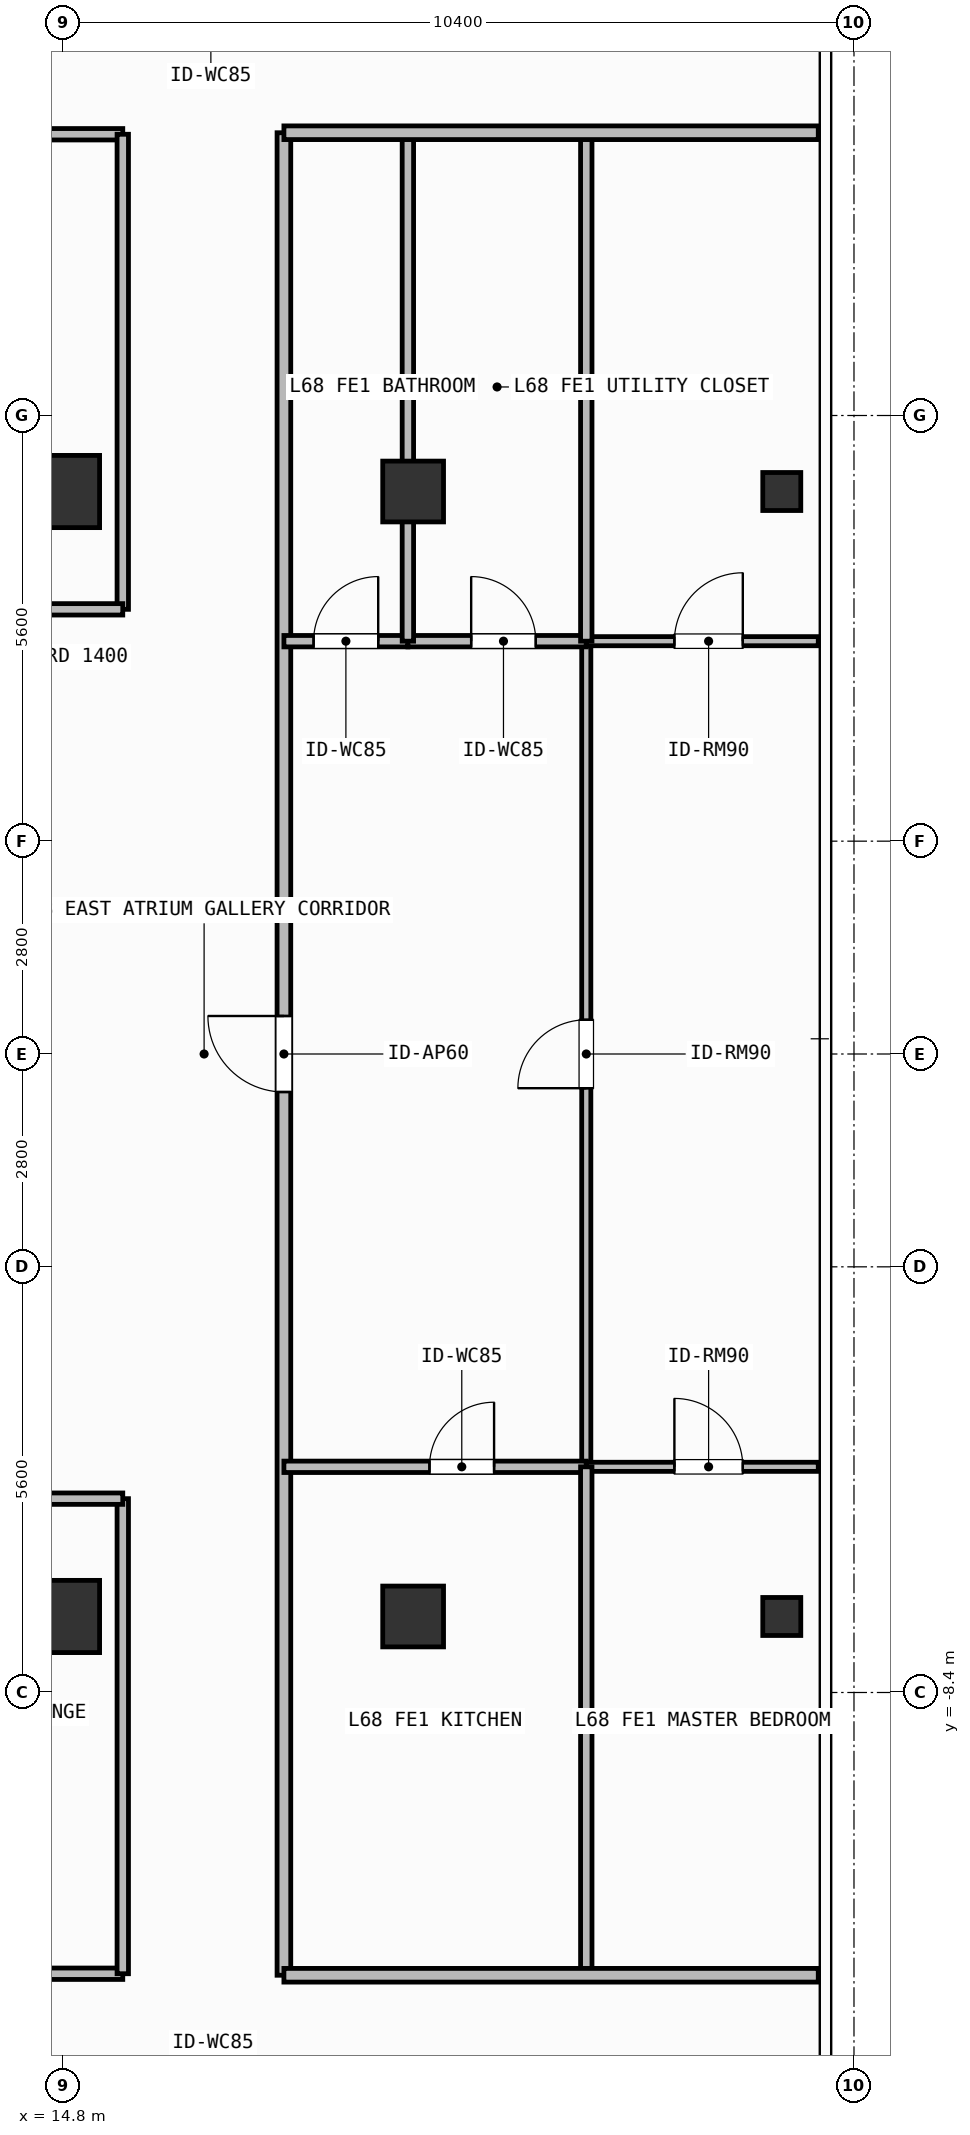
"""IFC4 building model, lengths in metres.
Left out: names, types, materials, properties, quantities, classifications, styles, units other than length and angle.
Written with IfcOpenShell. Run it as: python <this file> out.ifc"""

import sys

from ifc_helpers import new_model, si_unit, direction, frame, frame_2d, origin, origin_2d, place, context, subcontext, project, spatial, rectangle, hollow_rectangle, extrude, element, fill, save


model = new_model("IFC4")
c1 = context("Model", 3, precision=1e-05, world=origin(), true_north=direction((0.0, 1.0)))
c2 = subcontext(c1, "Body", "Model", "MODEL_VIEW")
j1 = project(units=[si_unit("LENGTHUNIT", "METRE"), si_unit("PLANEANGLEUNIT", "RADIAN")], contexts=[c1])
p1 = place(None, origin())
s1 = spatial("IfcSite", under=j1, at=p1, CompositionType="ELEMENT")
p2 = place(p1, origin())
s2 = spatial("IfcBuilding", under=s1, at=p2, CompositionType="ELEMENT")
p3 = place(p2, frame((0.0, 0.0, 278.1)))
s3 = spatial("IfcBuildingStorey", under=s2, at=p3, CompositionType="ELEMENT", Elevation=278.1)
for number, where, z_axis, x_axis in (
    (1, (14.8, -7.4, 0.0), (0.0, 0.0, 1.0), (1.0, 0.0, 0.0)),
    (2, (14.8, 7.4, 0.0), (0.0, 0.0, 1.0), (1.0, 0.0, 0.0)),
):
    element("IfcColumn", number, at=place(p3, frame(where, z_axis=z_axis, x_axis=x_axis)), inside=s3, PredefinedType="COLUMN", context=c2, shape_type="SweptSolid", body=[
        extrude(rectangle(XDim=0.95, YDim=0.95, at=origin_2d()), origin(), (0.0, 0.0, 1.0), 3.9),
    ])
for number, where, z_axis, x_axis in (
    (3, (19.4, -7.4, 0.0), (0.0, 0.0, 1.0), (1.0, 0.0, 0.0)),
    (4, (19.4, 7.4, 0.0), (0.0, 0.0, 1.0), (1.0, 0.0, 0.0)),
):
    element("IfcColumn", number, at=place(p3, frame(where, z_axis=z_axis, x_axis=x_axis)), inside=s3, PredefinedType="COLUMN", context=c2, shape_type="SweptSolid", body=[
        extrude(hollow_rectangle(XDim=0.8, YDim=0.8, WallThickness=0.036, at=origin_2d()), origin(), (0.0, 0.0, 1.0), 3.9),
    ])
for number, where, z_axis, x_axis in (
    (5, (24.25, -7.4, 0.0), (0.0, 0.0, 1.0), (1.0, 0.0, 0.0)),
    (6, (24.25, 7.4, 0.0), (0.0, 0.0, 1.0), (1.0, 0.0, 0.0)),
):
    element("IfcColumn", number, at=place(p3, frame(where, z_axis=z_axis, x_axis=x_axis)), inside=s3, PredefinedType="COLUMN", context=c2, shape_type="SweptSolid", body=[
        extrude(hollow_rectangle(XDim=0.5, YDim=0.5, WallThickness=0.025, at=origin_2d()), origin(), (0.0, 0.0, 1.0), 3.9),
    ])
p4 = place(p3, frame((10.1, -12.1, 0.0), z_axis=(0.0, 0.0, 1.0), x_axis=(1.0, 0.0, 0.0)))
e7 = element("IfcWall", 7, at=p4, inside=s3, PredefinedType="PARTITIONING", context=c2, shape_type="SweptSolid", body=[
    extrude(rectangle(XDim=5.48, YDim=0.15, at=frame_2d((2.74, 0.0))), origin(), (0.0, 0.0, 1.0), 3.68),
])
p5 = place(p4, frame((2.29, 0.0, 0.0)))
e8 = element("IfcOpeningElement", 8, at=p5, cuts=e7, PredefinedType="OPENING", context=c2, shape_type="SweptSolid", body=[
    extrude(rectangle(XDim=0.9, YDim=2.1, at=frame_2d((0.45, 1.05))), frame((0.0, 0.085, 0.0), z_axis=(0.0, -1.0, 0.0), x_axis=(1.0, 0.0, 0.0)), (0.0, 0.0, 1.0), 0.17),
])
p6 = place(p3, frame((8.36, 12.1, 0.0), z_axis=(0.0, 0.0, 1.0), x_axis=(1.0, 0.0, 0.0)))
e9 = element("IfcWall", 9, at=p6, inside=s3, PredefinedType="PARTITIONING", context=c2, shape_type="SweptSolid", body=[
    extrude(rectangle(XDim=7.22, YDim=0.15, at=frame_2d((3.61, 0.0))), origin(), (0.0, 0.0, 1.0), 3.68),
])
p7 = place(p6, frame((3.513, 0.0, 0.0)))
e10 = element("IfcOpeningElement", 10, at=p7, cuts=e9, PredefinedType="OPENING", context=c2, shape_type="SweptSolid", body=[
    extrude(rectangle(XDim=0.9, YDim=2.1, at=frame_2d((0.45, 1.05))), frame((0.0, 0.085, 0.0), z_axis=(0.0, -1.0, 0.0), x_axis=(1.0, 0.0, 0.0)), (0.0, 0.0, 1.0), 0.17),
])
p8 = place(p3, frame((17.7, -12.12, 0.0), z_axis=(0.0, 0.0, 1.0), x_axis=(0.0, 1.0, 0.0)))
e11 = element("IfcWall", 11, at=p8, inside=s3, PredefinedType="PARTITIONING", context=c2, shape_type="SweptSolid", body=[
    extrude(rectangle(XDim=24.24, YDim=0.18, at=frame_2d((12.12, 0.0))), origin(), (0.0, 0.0, 1.0), 3.68),
])
p9 = place(p8, frame((11.62, 0.0, 0.0)))
e12 = element("IfcOpeningElement", 12, at=p9, cuts=e11, PredefinedType="OPENING", context=c2, shape_type="SweptSolid", body=[
    extrude(rectangle(XDim=1.0, YDim=2.2, at=frame_2d((0.5, 1.1))), frame((0.0, 0.1, 0.0), z_axis=(0.0, -1.0, 0.0), x_axis=(1.0, 0.0, 0.0)), (0.0, 0.0, 1.0), 0.2),
])
p10 = place(p3, frame((21.678, -5.431, 0.0), z_axis=(0.0, 0.0, 1.0), x_axis=(0.0, 1.0, 0.0)))
e13 = element("IfcWall", 13, at=p10, inside=s3, PredefinedType="PARTITIONING", context=c2, shape_type="SweptSolid", body=[
    extrude(rectangle(XDim=10.862, YDim=0.12, at=frame_2d((5.431, 0.0))), origin(), (0.0, 0.0, 1.0), 3.68),
])
p11 = place(p10, frame((4.981, 0.0, 0.0)))
e14 = element("IfcOpeningElement", 14, at=p11, cuts=e13, PredefinedType="OPENING", context=c2, shape_type="SweptSolid", body=[
    extrude(rectangle(XDim=0.9, YDim=2.1, at=frame_2d((0.45, 1.05))), frame((0.0, 0.07, 0.0), z_axis=(0.0, -1.0, 0.0), x_axis=(1.0, 0.0, 0.0)), (0.0, 0.0, 1.0), 0.14),
])
p12 = place(p3, frame((17.7, 5.431, 0.0), z_axis=(0.0, 0.0, 1.0), x_axis=(1.0, 0.0, 0.0)))
e15 = element("IfcWall", 15, at=p12, inside=s3, PredefinedType="PARTITIONING", context=c2, shape_type="SweptSolid", body=[
    extrude(rectangle(XDim=1.631, YDim=0.15, at=frame_2d((0.815, 0.0))), origin(), (0.0, 0.0, 1.0), 3.68),
])
p13 = place(p12, frame((0.39, 0.0, 0.0)))
e16 = element("IfcOpeningElement", 16, at=p13, cuts=e15, PredefinedType="OPENING", context=c2, shape_type="SweptSolid", body=[
    extrude(rectangle(XDim=0.85, YDim=2.1, at=frame_2d((0.425, 1.05))), frame((0.0, 0.085, 0.0), z_axis=(0.0, -1.0, 0.0), x_axis=(1.0, 0.0, 0.0)), (0.0, 0.0, 1.0), 0.17),
])
p14 = place(p3, frame((19.331, 5.431, 0.0), z_axis=(0.0, 0.0, 1.0), x_axis=(1.0, 0.0, 0.0)))
e17 = element("IfcWall", 17, at=p14, inside=s3, PredefinedType="PARTITIONING", context=c2, shape_type="SweptSolid", body=[
    extrude(rectangle(XDim=2.347, YDim=0.15, at=frame_2d((1.173, 0.0))), origin(), (0.0, 0.0, 1.0), 3.68),
])
p15 = place(p14, frame((0.833, 0.0, 0.0)))
e18 = element("IfcOpeningElement", 18, at=p15, cuts=e17, PredefinedType="OPENING", context=c2, shape_type="SweptSolid", body=[
    extrude(rectangle(XDim=0.85, YDim=2.1, at=frame_2d((0.425, 1.05))), frame((0.0, 0.085, 0.0), z_axis=(0.0, -1.0, 0.0), x_axis=(1.0, 0.0, 0.0)), (0.0, 0.0, 1.0), 0.17),
])
p16 = place(p3, frame((17.7, -5.431, 0.0), z_axis=(0.0, 0.0, 1.0), x_axis=(1.0, 0.0, 0.0)))
e19 = element("IfcWall", 19, at=p16, inside=s3, PredefinedType="PARTITIONING", context=c2, shape_type="SweptSolid", body=[
    extrude(rectangle(XDim=3.978, YDim=0.15, at=frame_2d((1.989, 0.0))), origin(), (0.0, 0.0, 1.0), 3.68),
])
p17 = place(p16, frame((1.915, 0.0, 0.0)))
e20 = element("IfcOpeningElement", 20, at=p17, cuts=e19, PredefinedType="OPENING", context=c2, shape_type="SweptSolid", body=[
    extrude(rectangle(XDim=0.85, YDim=2.1, at=frame_2d((0.425, 1.05))), frame((0.0, 0.085, 0.0), z_axis=(0.0, -1.0, 0.0), x_axis=(1.0, 0.0, 0.0)), (0.0, 0.0, 1.0), 0.17),
])
p18 = place(p3, frame((21.678, -5.431, 0.0), z_axis=(0.0, 0.0, 1.0), x_axis=(1.0, 0.0, 0.0)))
e21 = element("IfcWall", 21, at=p18, inside=s3, PredefinedType="PARTITIONING", context=c2, shape_type="SweptSolid", body=[
    extrude(rectangle(XDim=3.052, YDim=0.12, at=frame_2d((1.526, 0.0))), origin(), (0.0, 0.0, 1.0), 3.68),
])
p19 = place(p18, frame((1.159, 0.0, 0.0)))
e22 = element("IfcOpeningElement", 22, at=p19, cuts=e21, PredefinedType="OPENING", context=c2, shape_type="SweptSolid", body=[
    extrude(rectangle(XDim=0.9, YDim=2.1, at=frame_2d((0.45, 1.05))), frame((0.0, 0.07, 0.0), z_axis=(0.0, -1.0, 0.0), x_axis=(1.0, 0.0, 0.0)), (0.0, 0.0, 1.0), 0.14),
])
p20 = place(p3, frame((21.678, 5.431, 0.0), z_axis=(0.0, 0.0, 1.0), x_axis=(1.0, 0.0, 0.0)))
e23 = element("IfcWall", 23, at=p20, inside=s3, PredefinedType="PARTITIONING", context=c2, shape_type="SweptSolid", body=[
    extrude(rectangle(XDim=3.052, YDim=0.12, at=frame_2d((1.526, 0.0))), origin(), (0.0, 0.0, 1.0), 3.68),
])
p21 = place(p20, frame((1.159, 0.0, 0.0)))
e24 = element("IfcOpeningElement", 24, at=p21, cuts=e23, PredefinedType="OPENING", context=c2, shape_type="SweptSolid", body=[
    extrude(rectangle(XDim=0.9, YDim=2.1, at=frame_2d((0.45, 1.05))), frame((0.0, 0.07, 0.0), z_axis=(0.0, -1.0, 0.0), x_axis=(1.0, 0.0, 0.0)), (0.0, 0.0, 1.0), 0.14),
])
p22 = place(p3, frame((15.58, -12.1, 0.0), z_axis=(0.0, 0.0, 1.0), x_axis=(0.0, 1.0, 0.0)))
e25 = element("IfcWall", 25, at=p22, inside=s3, PredefinedType="PARTITIONING", context=c2, shape_type="SweptSolid", body=[
    extrude(rectangle(XDim=6.25, YDim=0.15, at=frame_2d((3.125, 0.0))), origin(), (0.0, 0.0, 1.0), 3.68),
])
p23 = place(p3, frame((8.96, -5.85, 0.0), z_axis=(0.0, 0.0, 1.0), x_axis=(1.0, 0.0, 0.0)))
e26 = element("IfcWall", 26, at=p23, inside=s3, PredefinedType="PARTITIONING", context=c2, shape_type="SweptSolid", body=[
    extrude(rectangle(XDim=6.62, YDim=0.15, at=frame_2d((3.31, 0.0))), origin(), (0.0, 0.0, 1.0), 3.68),
])
p24 = place(p3, frame((15.58, 5.85, 0.0), z_axis=(0.0, 0.0, 1.0), x_axis=(0.0, 1.0, 0.0)))
e27 = element("IfcWall", 27, at=p24, inside=s3, PredefinedType="PARTITIONING", context=c2, shape_type="SweptSolid", body=[
    extrude(rectangle(XDim=6.25, YDim=0.15, at=frame_2d((3.125, 0.0))), origin(), (0.0, 0.0, 1.0), 3.68),
])
p25 = place(p3, frame((8.96, 5.85, 0.0), z_axis=(0.0, 0.0, 1.0), x_axis=(1.0, 0.0, 0.0)))
e28 = element("IfcWall", 28, at=p25, inside=s3, PredefinedType="PARTITIONING", context=c2, shape_type="SweptSolid", body=[
    extrude(rectangle(XDim=6.62, YDim=0.15, at=frame_2d((3.31, 0.0))), origin(), (0.0, 0.0, 1.0), 3.68),
])
p26 = place(p3, frame((19.331, 5.431, 0.0), z_axis=(0.0, 0.0, 1.0), x_axis=(0.0, 1.0, 0.0)))
e29 = element("IfcWall", 29, at=p26, inside=s3, PredefinedType="PARTITIONING", context=c2, shape_type="SweptSolid", body=[
    extrude(rectangle(XDim=6.689, YDim=0.15, at=frame_2d((3.345, 0.0))), origin(), (0.0, 0.0, 1.0), 3.182),
])
for number, where, z_axis, x_axis in (
    (30, (21.678, -12.12, 0.0), (0.0, 0.0, 1.0), (0.0, 1.0, 0.0)),
    (31, (21.678, 5.431, 0.0), (0.0, 0.0, 1.0), (0.0, 1.0, 0.0)),
):
    element("IfcWall", number, at=place(p3, frame(where, z_axis=z_axis, x_axis=x_axis)), inside=s3, PredefinedType="PARTITIONING", context=c2, shape_type="SweptSolid", body=[
        extrude(rectangle(XDim=6.689, YDim=0.15, at=frame_2d((3.345, 0.0))), origin(), (0.0, 0.0, 1.0), 3.68),
    ])
for number, where, z_axis, x_axis in (
    (32, (17.7, -12.12, 0.0), (0.0, 0.0, 1.0), (1.0, 0.0, 0.0)),
    (33, (17.7, 12.12, 0.0), (0.0, 0.0, 1.0), (1.0, 0.0, 0.0)),
):
    element("IfcWall", number, at=place(p3, frame(where, z_axis=z_axis, x_axis=x_axis)), inside=s3, PredefinedType="PARTITIONING", context=c2, shape_type="SweptSolid", body=[
        extrude(rectangle(XDim=7.03, YDim=0.18, at=frame_2d((3.515, 0.0))), origin(), (0.0, 0.0, 1.0), 3.68),
    ])
p27 = place(p9, origin())
e34 = element("IfcDoor", 34, at=p27, inside=s3, OperationType="SINGLE_SWING_RIGHT", PredefinedType="DOOR", context=c2, shape_type="SweptSolid", body=[
    extrude(rectangle(XDim=1.0, YDim=2.2, at=frame_2d((0.5, 1.1))), frame((0.0, 0.025, 0.0), z_axis=(0.0, -1.0, 0.0), x_axis=(1.0, 0.0, 0.0)), (0.0, 0.0, 1.0), 0.05),
])
fill(e12, e34)
p28 = place(p11, origin())
e35 = element("IfcDoor", 35, at=p28, inside=s3, OperationType="SINGLE_SWING_LEFT", PredefinedType="DOOR", context=c2, shape_type="SweptSolid", body=[
    extrude(rectangle(XDim=0.9, YDim=2.1, at=frame_2d((0.45, 1.05))), frame((0.0, 0.025, 0.0), z_axis=(0.0, -1.0, 0.0), x_axis=(1.0, 0.0, 0.0)), (0.0, 0.0, 1.0), 0.05),
])
fill(e14, e35)
p29 = place(p13, origin())
e36 = element("IfcDoor", 36, at=p29, inside=s3, OperationType="SINGLE_SWING_RIGHT", PredefinedType="DOOR", context=c2, shape_type="SweptSolid", body=[
    extrude(rectangle(XDim=0.85, YDim=2.1, at=frame_2d((0.425, 1.05))), frame((0.0, 0.025, 0.0), z_axis=(0.0, -1.0, 0.0), x_axis=(1.0, 0.0, 0.0)), (0.0, 0.0, 1.0), 0.05),
])
fill(e16, e36)
p30 = place(p15, origin())
e37 = element("IfcDoor", 37, at=p30, inside=s3, OperationType="SINGLE_SWING_LEFT", PredefinedType="DOOR", context=c2, shape_type="SweptSolid", body=[
    extrude(rectangle(XDim=0.85, YDim=2.1, at=frame_2d((0.425, 1.05))), frame((0.0, 0.025, 0.0), z_axis=(0.0, -1.0, 0.0), x_axis=(1.0, 0.0, 0.0)), (0.0, 0.0, 1.0), 0.05),
])
fill(e18, e37)
p31 = place(p17, origin())
e38 = element("IfcDoor", 38, at=p31, inside=s3, OperationType="SINGLE_SWING_RIGHT", PredefinedType="DOOR", context=c2, shape_type="SweptSolid", body=[
    extrude(rectangle(XDim=0.85, YDim=2.1, at=frame_2d((0.425, 1.05))), frame((0.0, 0.025, 0.0), z_axis=(0.0, -1.0, 0.0), x_axis=(1.0, 0.0, 0.0)), (0.0, 0.0, 1.0), 0.05),
])
fill(e20, e38)
p32 = place(p19, origin())
e39 = element("IfcDoor", 39, at=p32, inside=s3, OperationType="SINGLE_SWING_LEFT", PredefinedType="DOOR", context=c2, shape_type="SweptSolid", body=[
    extrude(rectangle(XDim=0.9, YDim=2.1, at=frame_2d((0.45, 1.05))), frame((0.0, 0.025, 0.0), z_axis=(0.0, -1.0, 0.0), x_axis=(1.0, 0.0, 0.0)), (0.0, 0.0, 1.0), 0.05),
])
fill(e22, e39)
p33 = place(p21, origin())
e40 = element("IfcDoor", 40, at=p33, inside=s3, OperationType="SINGLE_SWING_RIGHT", PredefinedType="DOOR", context=c2, shape_type="SweptSolid", body=[
    extrude(rectangle(XDim=0.9, YDim=2.1, at=frame_2d((0.45, 1.05))), frame((0.0, 0.025, 0.0), z_axis=(0.0, -1.0, 0.0), x_axis=(1.0, 0.0, 0.0)), (0.0, 0.0, 1.0), 0.05),
])
fill(e24, e40)
save(model, sys.argv[1])
